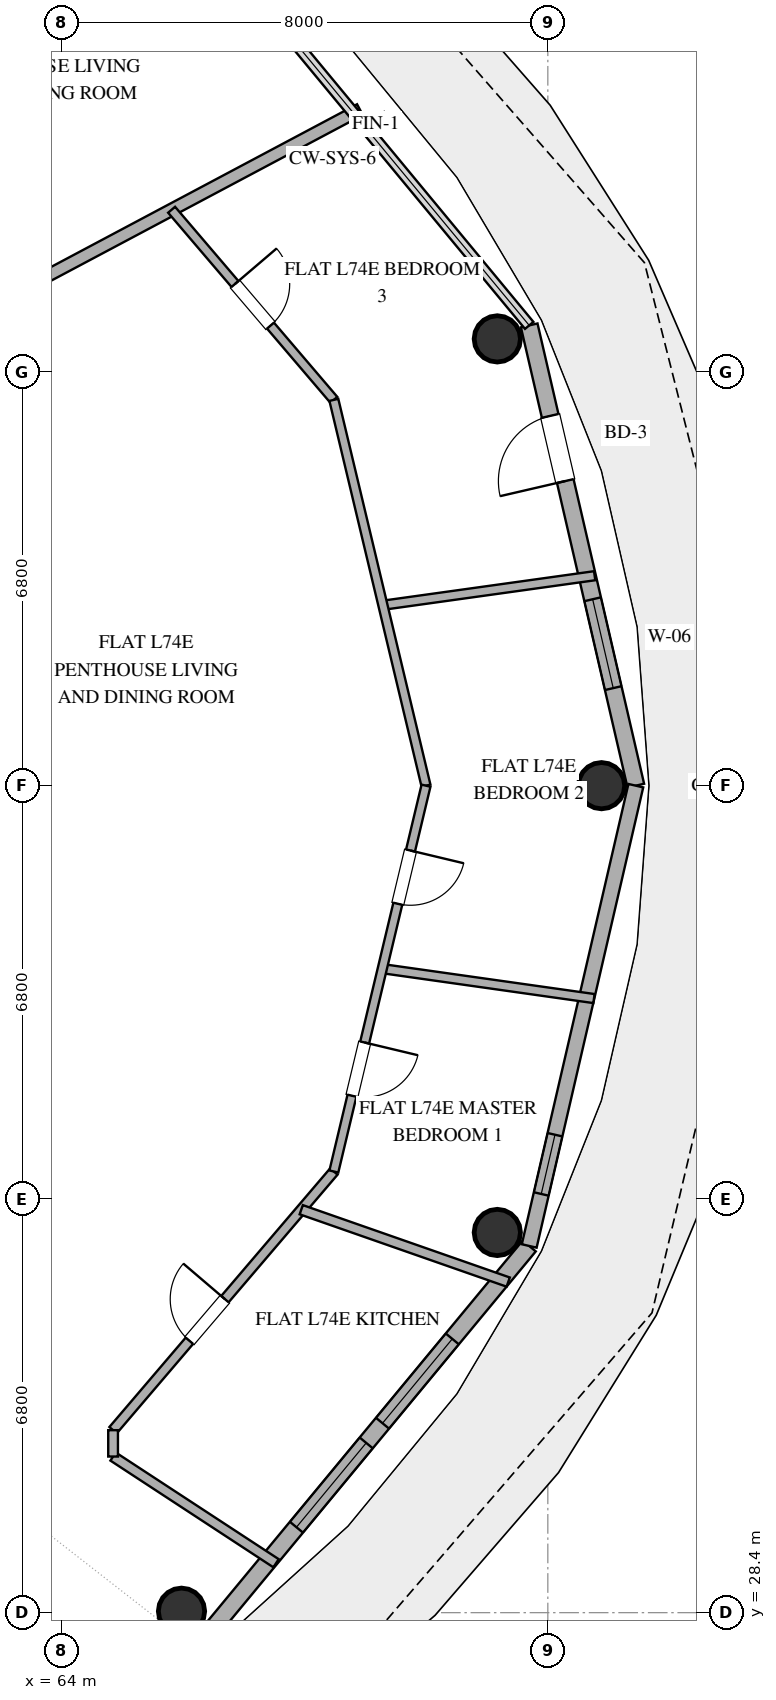
"""IFC4 building model, lengths in metres.
Left out: names, types, materials, properties, quantities, classifications, styles, units other than length and angle.
Written with IfcOpenShell. Run it as: python <this file> out.ifc"""

import sys

from ifc_helpers import new_model, si_unit, direction, frame, frame_2d, origin, origin_2d, place, context, subcontext, project, spatial, rectangle, hollow_circle, extrude, element, fill, save


model = new_model("IFC4")
c1 = context("Model", 3, precision=1e-05, world=origin(), true_north=direction((0.0, 1.0)))
c2 = subcontext(c1, "Body", "Model", "MODEL_VIEW")
j1 = project(units=[si_unit("LENGTHUNIT", "METRE"), si_unit("PLANEANGLEUNIT", "RADIAN")], contexts=[c1])
p1 = place(None, origin())
s1 = spatial("IfcSite", under=j1, at=p1, CompositionType="ELEMENT")
p2 = place(p1, origin())
s2 = spatial("IfcBuilding", under=s1, at=p2, CompositionType="ELEMENT")
p3 = place(p2, frame((0.0, 0.0, 287.4)))
s3 = spatial("IfcBuildingStorey", under=s2, at=p3, CompositionType="ELEMENT", Elevation=287.4)
for number, where, z_axis, x_axis in (
    (1, (72.883, 42.0, 0.0), (0.0, 0.0, 1.0), (1.0, 0.0, 0.0)),
    (2, (71.169, 49.347, 0.0), (0.0, 0.0, 1.0), (1.0, 0.0, 0.0)),
    (3, (65.975, 28.424, 0.0), (0.0, 0.0, 1.0), (1.0, 0.0, 0.0)),
    (4, (71.169, 34.653, 0.0), (0.0, 0.0, 1.0), (1.0, 0.0, 0.0)),
):
    element("IfcColumn", number, at=place(p3, frame(where, z_axis=z_axis, x_axis=x_axis)), inside=s3, PredefinedType="COLUMN", context=c2, shape_type="SweptSolid", body=[
        extrude(hollow_circle(Radius=0.381, WallThickness=0.025, at=origin_2d()), origin(), (0.0, 0.0, 1.0), 3.37),
    ])
p4 = place(p3, frame((73.447, 42.0, 0.0), z_axis=(0.0, 0.0, 1.0), x_axis=(-0.225635078214, 0.974211892495, 0.0)))
e5 = element("IfcWall", 5, at=p4, inside=s3, PredefinedType="SOLIDWALL", context=c2, shape_type="SweptSolid", body=[
    extrude(rectangle(XDim=7.77, YDim=0.28, at=frame_2d((3.885, 0.0))), origin(), (0.0, 0.0, 1.0), 3.37),
])
p5 = place(p4, frame((1.647, 0.0, 0.85)))
e6 = element("IfcOpeningElement", 6, at=p5, cuts=e5, PredefinedType="OPENING", context=c2, shape_type="SweptSolid", body=[
    extrude(rectangle(XDim=1.5, YDim=2.0, at=frame_2d((0.75, 1.0))), frame((0.0, 0.15, 0.0), z_axis=(0.0, -1.0, 0.0), x_axis=(1.0, 0.0, 0.0)), (0.0, 0.0, 1.0), 0.3),
])
p6 = place(p4, frame((5.142, 0.0, 0.0)))
e7 = element("IfcOpeningElement", 7, at=p6, cuts=e5, PredefinedType="OPENING", context=c2, shape_type="SweptSolid", body=[
    extrude(rectangle(XDim=1.1, YDim=2.25, at=frame_2d((0.55, 1.125))), frame((0.0, 0.15, 0.0), z_axis=(0.0, -1.0, 0.0), x_axis=(1.0, 0.0, 0.0)), (0.0, 0.0, 1.0), 0.3),
])
p7 = place(p3, frame((66.383, 28.013, 0.0), z_axis=(0.0, 0.0, 1.0), x_axis=(0.63761509934, 0.770355103243, 0.0)))
e8 = element("IfcWall", 8, at=p7, inside=s3, PredefinedType="SOLIDWALL", context=c2, shape_type="SweptSolid", body=[
    extrude(rectangle(XDim=8.33, YDim=0.28, at=frame_2d((4.165, 0.0))), origin(), (0.0, 0.0, 1.0), 3.37),
])
p8 = place(p7, frame((2.326, 0.0, 0.85)))
e9 = element("IfcOpeningElement", 9, at=p8, cuts=e8, PredefinedType="OPENING", context=c2, shape_type="SweptSolid", body=[
    extrude(rectangle(XDim=1.8, YDim=2.2, at=frame_2d((0.9, 1.1))), frame((0.0, 0.15, 0.0), z_axis=(0.0, -1.0, 0.0), x_axis=(1.0, 0.0, 0.0)), (0.0, 0.0, 1.0), 0.3),
])
p9 = place(p7, frame((4.546, 0.0, 0.85)))
e10 = element("IfcOpeningElement", 10, at=p9, cuts=e8, PredefinedType="OPENING", context=c2, shape_type="SweptSolid", body=[
    extrude(rectangle(XDim=1.8, YDim=2.2, at=frame_2d((0.9, 1.1))), frame((0.0, 0.15, 0.0), z_axis=(0.0, -1.0, 0.0), x_axis=(1.0, 0.0, 0.0)), (0.0, 0.0, 1.0), 0.3),
])
p10 = place(p3, frame((71.694, 34.43, 0.0), z_axis=(0.0, 0.0, 1.0), x_axis=(0.225635078214, 0.974211892495, 0.0)))
e11 = element("IfcWall", 11, at=p10, inside=s3, PredefinedType="SOLIDWALL", context=c2, shape_type="SweptSolid", body=[
    extrude(rectangle(XDim=7.77, YDim=0.25, at=frame_2d((3.885, 0.0))), origin(), (0.0, 0.0, 1.0), 3.37),
])
p11 = place(p10, frame((0.878, 0.0, 1.42)))
e12 = element("IfcOpeningElement", 12, at=p11, cuts=e11, PredefinedType="OPENING", context=c2, shape_type="SweptSolid", body=[
    extrude(rectangle(XDim=1.0, YDim=1.05, at=frame_2d((0.5, 0.525))), frame((0.0, 0.135, 0.0), z_axis=(0.0, -1.0, 0.0), x_axis=(1.0, 0.0, 0.0)), (0.0, 0.0, 1.0), 0.27),
])
p12 = place(p3, frame((68.909, 53.118, 0.0), z_axis=(0.0, 0.0, 1.0), x_axis=(-0.882939716422, -0.469486375909, 0.0)))
e13 = element("IfcWall", 13, at=p12, inside=s3, PredefinedType="PARTITIONING", context=c2, shape_type="SweptSolid", body=[
    extrude(rectangle(XDim=8.732, YDim=0.2, at=frame_2d((4.366, 0.0))), origin(), (0.0, 0.0, 1.0), 2.73),
])
p13 = place(p3, frame((64.85, 31.401, 0.0), z_axis=(0.0, 0.0, 1.0), x_axis=(0.649208179997, 0.760610767097, 0.0)))
e14 = element("IfcWall", 14, at=p13, inside=s3, PredefinedType="PLUMBINGWALL", context=c2, shape_type="SweptSolid", body=[
    extrude(rectangle(XDim=5.593, YDim=0.16, at=frame_2d((2.796, 0.0))), origin(), (0.0, 0.0, 1.0), 2.73),
])
p14 = place(p13, frame((1.933, 0.0, 0.0)))
e15 = element("IfcOpeningElement", 15, at=p14, cuts=e14, PredefinedType="OPENING", context=c2, shape_type="SweptSolid", body=[
    extrude(rectangle(XDim=0.9, YDim=2.1, at=frame_2d((0.45, 1.05))), frame((0.0, 0.09, 0.0), z_axis=(0.0, -1.0, 0.0), x_axis=(1.0, 0.0, 0.0)), (0.0, 0.0, 1.0), 0.18),
])
p15 = place(p3, frame((65.812, 51.471, 0.0), z_axis=(0.0, 0.0, 1.0), x_axis=(0.649224667474, -0.760596694145, 0.0)))
e16 = element("IfcWall", 16, at=p15, inside=s3, PredefinedType="PARTITIONING", context=c2, shape_type="SweptSolid", body=[
    extrude(rectangle(XDim=4.11, YDim=0.15, at=frame_2d((2.055, 0.0))), origin(), (0.0, 0.0, 1.0), 2.73),
])
p16 = place(p15, frame((1.605, 0.0, 0.0)))
e17 = element("IfcOpeningElement", 17, at=p16, cuts=e16, PredefinedType="OPENING", context=c2, shape_type="SweptSolid", body=[
    extrude(rectangle(XDim=0.9, YDim=2.1, at=frame_2d((0.45, 1.05))), frame((0.0, 0.085, 0.0), z_axis=(0.0, -1.0, 0.0), x_axis=(1.0, 0.0, 0.0)), (0.0, 0.0, 1.0), 0.17),
])
p17 = place(p3, frame((71.348, 33.837, 0.0), z_axis=(0.0, 0.0, 1.0), x_axis=(-0.943978629209, 0.330006587202, 0.0)))
e18 = element("IfcWall", 18, at=p17, inside=s3, PredefinedType="PLUMBINGWALL", context=c2, shape_type="SweptSolid", body=[
    extrude(rectangle(XDim=3.606, YDim=0.16, at=frame_2d((1.803, 0.0))), origin(), (0.0, 0.0, 1.0), 2.73),
])
p18 = place(p3, frame((69.288, 44.967, 0.0), z_axis=(0.0, 0.0, 1.0), x_axis=(0.990426984163, 0.138037636323, 0.0)))
e19 = element("IfcWall", 19, at=p18, inside=s3, PredefinedType="PARTITIONING", context=c2, shape_type="SweptSolid", body=[
    extrude(rectangle(XDim=3.516, YDim=0.15, at=frame_2d((1.758, 0.0))), origin(), (0.0, 0.0, 1.0), 2.73),
])
p19 = place(p3, frame((72.759, 38.499, 0.0), z_axis=(0.0, 0.0, 1.0), x_axis=(-0.990152617328, 0.139992122627, 0.0)))
e20 = element("IfcWall", 20, at=p19, inside=s3, PredefinedType="PARTITIONING", context=c2, shape_type="SweptSolid", body=[
    extrude(rectangle(XDim=3.516, YDim=0.15, at=frame_2d((1.758, 0.0))), origin(), (0.0, 0.0, 1.0), 2.73),
])
p20 = place(p3, frame((68.481, 48.345, 0.0), z_axis=(0.0, 0.0, 1.0), x_axis=(0.232298462197, -0.972644551962, 0.0)))
e21 = element("IfcWall", 21, at=p20, inside=s3, PredefinedType="PARTITIONING", context=c2, shape_type="SweptSolid", body=[
    extrude(rectangle(XDim=6.523, YDim=0.15, at=frame_2d((3.262, 0.0))), origin(), (0.0, 0.0, 1.0), 2.73),
])
p21 = place(p3, frame((69.996, 42.0, 0.0), z_axis=(0.0, 0.0, 1.0), x_axis=(-0.232298462197, -0.972644551962, 0.0)))
e22 = element("IfcWall", 22, at=p21, inside=s3, PredefinedType="PARTITIONING", context=c2, shape_type="SweptSolid", body=[
    extrude(rectangle(XDim=6.523, YDim=0.15, at=frame_2d((3.262, 0.0))), origin(), (0.0, 0.0, 1.0), 2.73),
])
p22 = place(p21, frame((4.342, 0.0, 0.0)))
e23 = element("IfcOpeningElement", 23, at=p22, cuts=e22, PredefinedType="OPENING", context=c2, shape_type="SweptSolid", body=[
    extrude(rectangle(XDim=0.9, YDim=2.1, at=frame_2d((0.45, 1.05))), frame((0.0, 0.085, 0.0), z_axis=(0.0, -1.0, 0.0), x_axis=(1.0, 0.0, 0.0)), (0.0, 0.0, 1.0), 0.17),
])
p23 = place(p21, frame((1.097, 0.0, 0.0)))
e24 = element("IfcOpeningElement", 24, at=p23, cuts=e22, PredefinedType="OPENING", context=c2, shape_type="SweptSolid", body=[
    extrude(rectangle(XDim=0.9, YDim=2.1, at=frame_2d((0.45, 1.05))), frame((0.0, 0.085, 0.0), z_axis=(0.0, -1.0, 0.0), x_axis=(1.0, 0.0, 0.0)), (0.0, 0.0, 1.0), 0.17),
])
p24 = place(p3, frame((67.53, 29.213, 0.0), z_axis=(0.0, 0.0, 1.0), x_axis=(-0.836629755679, 0.547768794212, 0.0)))
e25 = element("IfcWall", 25, at=p24, inside=s3, PredefinedType="PLUMBINGWALL", context=c2, shape_type="SweptSolid", body=[
    extrude(rectangle(XDim=3.203, YDim=0.16, at=frame_2d((1.602, 0.0))), origin(), (0.0, 0.0, 1.0), 2.73),
])
p25 = place(p3, frame((64.85, 30.968, 0.0), z_axis=(0.0, 0.0, 1.0), x_axis=(0.0, 1.0, 0.0)))
e26 = element("IfcWall", 26, at=p25, inside=s3, PredefinedType="PLUMBINGWALL", context=c2, shape_type="SweptSolid", body=[
    extrude(rectangle(XDim=0.434, YDim=0.16, at=frame_2d((0.217, 0.0))), origin(), (0.0, 0.0, 1.0), 2.73),
])
p26 = place(p5, origin())
e27 = element("IfcWindow", 27, at=p26, inside=s3, PartitioningType="SINGLE_PANEL", PredefinedType="WINDOW", context=c2, shape_type="SweptSolid", body=[
    extrude(rectangle(XDim=1.5, YDim=2.0, at=frame_2d((0.75, 1.0))), frame((0.0, 0.03, 0.0), z_axis=(0.0, -1.0, 0.0), x_axis=(1.0, 0.0, 0.0)), (0.0, 0.0, 1.0), 0.06),
])
fill(e6, e27)
p27 = place(p6, origin())
e28 = element("IfcDoor", 28, at=p27, inside=s3, OperationType="SINGLE_SWING_LEFT", PredefinedType="DOOR", context=c2, shape_type="SweptSolid", body=[
    extrude(rectangle(XDim=1.1, YDim=2.25, at=frame_2d((0.55, 1.125))), frame((0.0, 0.025, 0.0), z_axis=(0.0, -1.0, 0.0), x_axis=(1.0, 0.0, 0.0)), (0.0, 0.0, 1.0), 0.05),
])
fill(e7, e28)
p28 = place(p8, origin())
e29 = element("IfcWindow", 29, at=p28, inside=s3, PartitioningType="SINGLE_PANEL", PredefinedType="WINDOW", context=c2, shape_type="SweptSolid", body=[
    extrude(rectangle(XDim=1.8, YDim=2.2, at=frame_2d((0.9, 1.1))), frame((0.0, 0.03, 0.0), z_axis=(0.0, -1.0, 0.0), x_axis=(1.0, 0.0, 0.0)), (0.0, 0.0, 1.0), 0.06),
])
fill(e9, e29)
p29 = place(p9, origin())
e30 = element("IfcWindow", 30, at=p29, inside=s3, PartitioningType="SINGLE_PANEL", PredefinedType="WINDOW", context=c2, shape_type="SweptSolid", body=[
    extrude(rectangle(XDim=1.8, YDim=2.2, at=frame_2d((0.9, 1.1))), frame((0.0, 0.03, 0.0), z_axis=(0.0, -1.0, 0.0), x_axis=(1.0, 0.0, 0.0)), (0.0, 0.0, 1.0), 0.06),
])
fill(e10, e30)
p30 = place(p11, origin())
e31 = element("IfcWindow", 31, at=p30, inside=s3, PartitioningType="SINGLE_PANEL", PredefinedType="WINDOW", context=c2, shape_type="SweptSolid", body=[
    extrude(rectangle(XDim=1.0, YDim=1.05, at=frame_2d((0.5, 0.525))), frame((0.0, 0.03, 0.0), z_axis=(0.0, -1.0, 0.0), x_axis=(1.0, 0.0, 0.0)), (0.0, 0.0, 1.0), 0.06),
])
fill(e12, e31)
p31 = place(p14, origin())
e32 = element("IfcDoor", 32, at=p31, inside=s3, OperationType="SINGLE_SWING_RIGHT", PredefinedType="DOOR", context=c2, shape_type="SweptSolid", body=[
    extrude(rectangle(XDim=0.9, YDim=2.1, at=frame_2d((0.45, 1.05))), frame((0.0, 0.025, 0.0), z_axis=(0.0, -1.0, 0.0), x_axis=(1.0, 0.0, 0.0)), (0.0, 0.0, 1.0), 0.05),
])
fill(e15, e32)
p32 = place(p16, origin())
e33 = element("IfcDoor", 33, at=p32, inside=s3, OperationType="SINGLE_SWING_LEFT", PredefinedType="DOOR", context=c2, shape_type="SweptSolid", body=[
    extrude(rectangle(XDim=0.9, YDim=2.1, at=frame_2d((0.45, 1.05))), frame((0.0, 0.025, 0.0), z_axis=(0.0, -1.0, 0.0), x_axis=(1.0, 0.0, 0.0)), (0.0, 0.0, 1.0), 0.05),
])
fill(e17, e33)
p33 = place(p22, origin())
e34 = element("IfcDoor", 34, at=p33, inside=s3, OperationType="SINGLE_SWING_LEFT", PredefinedType="DOOR", context=c2, shape_type="SweptSolid", body=[
    extrude(rectangle(XDim=0.9, YDim=2.1, at=frame_2d((0.45, 1.05))), frame((0.0, 0.025, 0.0), z_axis=(0.0, -1.0, 0.0), x_axis=(1.0, 0.0, 0.0)), (0.0, 0.0, 1.0), 0.05),
])
fill(e23, e34)
p34 = place(p23, origin())
e35 = element("IfcDoor", 35, at=p34, inside=s3, OperationType="SINGLE_SWING_LEFT", PredefinedType="DOOR", context=c2, shape_type="SweptSolid", body=[
    extrude(rectangle(XDim=0.9, YDim=2.1, at=frame_2d((0.45, 1.05))), frame((0.0, 0.025, 0.0), z_axis=(0.0, -1.0, 0.0), x_axis=(1.0, 0.0, 0.0)), (0.0, 0.0, 1.0), 0.05),
])
fill(e24, e35)
save(model, sys.argv[1])
